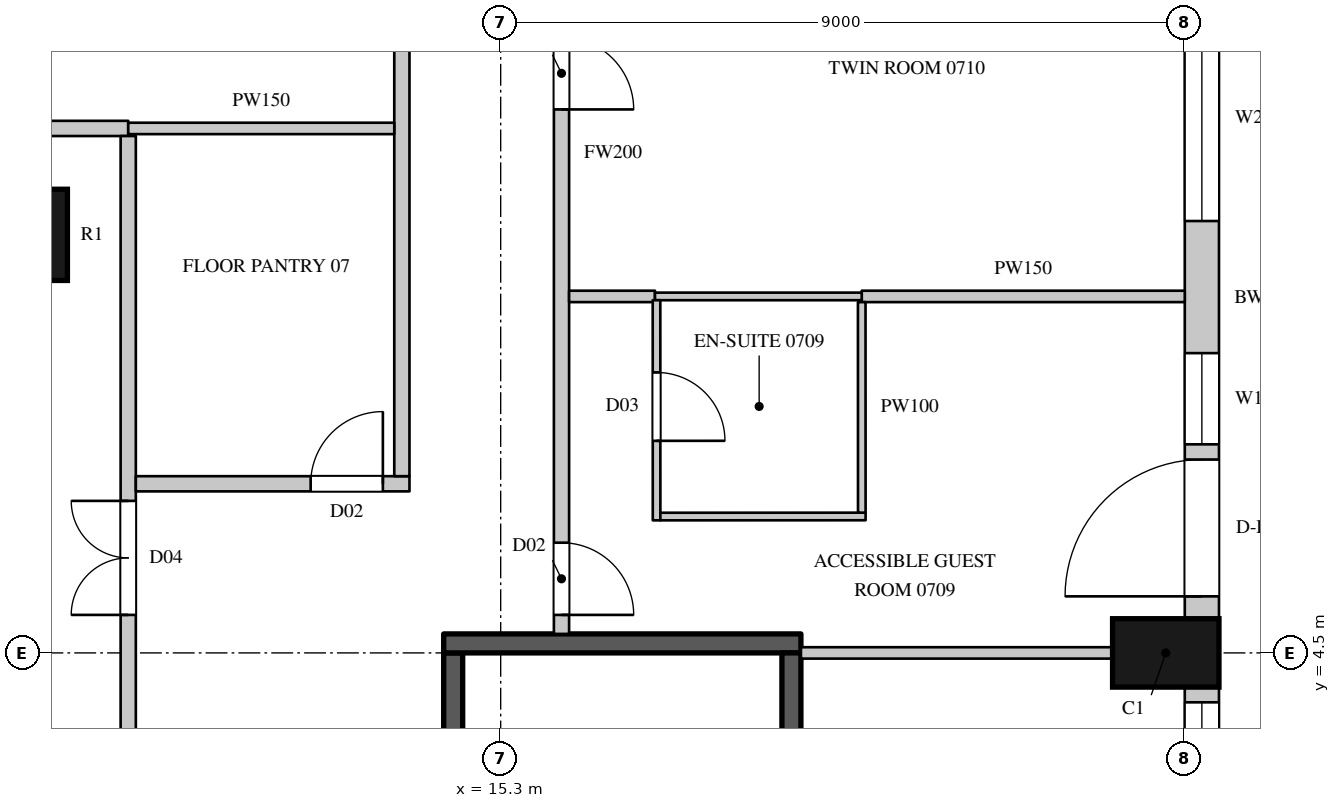
"""IFC4 building model, lengths in metres.
Left out: names, types, materials, properties, quantities, classifications, styles, units other than length and angle.
Written with IfcOpenShell. Run it as: python <this file> out.ifc"""

import sys

from ifc_helpers import new_model, si_unit, direction, frame, frame_2d, origin, origin_2d, place, context, subcontext, project, spatial, rectangle, circle, extrude, element, fill, save


model = new_model("IFC4")
c1 = context("Model", 3, precision=1e-05, world=origin(), true_north=direction((0.0, 1.0)))
c2 = subcontext(c1, "Body", "Model", "MODEL_VIEW")
j1 = project(units=[si_unit("LENGTHUNIT", "METRE"), si_unit("PLANEANGLEUNIT", "RADIAN")], contexts=[c1])
p1 = place(None, origin())
s1 = spatial("IfcSite", under=j1, at=p1, CompositionType="ELEMENT")
p2 = place(p1, origin())
s2 = spatial("IfcBuilding", under=s1, at=p2, CompositionType="ELEMENT")
p3 = place(p2, frame((0.0, 0.0, 55.5)))
s3 = spatial("IfcBuildingStorey", under=s2, at=p3, CompositionType="ELEMENT", Elevation=55.5)
p4 = place(p3, frame((24.05, 4.5, 0.0), z_axis=(0.0, 0.0, 1.0), x_axis=(0.0, 1.0, 0.0)))
e1 = element("IfcColumn", 1, at=p4, inside=s3, PredefinedType="COLUMN", context=c2, shape_type="SweptSolid", body=[
    extrude(rectangle(XDim=0.9, YDim=1.4, at=origin_2d()), origin(), (0.0, 0.0, 1.0), 3.6),
])
p5 = place(p3, frame((9.0, 10.0, 0.0), z_axis=(0.0, 0.0, 1.0), x_axis=(1.0, 0.0, 0.0)))
e2 = element("IfcColumn", 2, at=p5, inside=s3, PredefinedType="COLUMN", context=c2, shape_type="SweptSolid", body=[
    extrude(circle(Radius=0.6, at=origin_2d()), origin(), (0.0, 0.0, 1.0), 3.6),
])
p6 = place(p3, frame((24.525, -4.05, 0.0), z_axis=(0.0, 0.0, 1.0), x_axis=(0.0, 1.0, 0.0)))
e3 = element("IfcWall", 3, at=p6, inside=s3, PredefinedType="SOLIDWALL", context=c2, shape_type="SweptSolid", body=[
    extrude(rectangle(XDim=8.1, YDim=0.45, at=frame_2d((4.05, 0.0))), origin(), (0.0, 0.0, 1.0), 3.3),
])
p7 = place(p6, frame((0.2, 0.0, 0.0)))
e4 = element("IfcOpeningElement", 4, at=p7, cuts=e3, PredefinedType="OPENING", context=c2, shape_type="SweptSolid", body=[
    extrude(rectangle(XDim=1.8, YDim=2.4, at=frame_2d((0.9, 1.2))), frame((0.0, 0.235, 0.0), z_axis=(0.0, -1.0, 0.0), x_axis=(1.0, 0.0, 0.0)), (0.0, 0.0, 1.0), 0.47),
])
p8 = place(p6, frame((2.2, 0.0, 1.05)))
e5 = element("IfcOpeningElement", 5, at=p8, cuts=e3, PredefinedType="OPENING", context=c2, shape_type="SweptSolid", body=[
    extrude(rectangle(XDim=1.2, YDim=2.0, at=frame_2d((0.6, 1.0))), frame((0.0, 0.235, 0.0), z_axis=(0.0, -1.0, 0.0), x_axis=(1.0, 0.0, 0.0)), (0.0, 0.0, 1.0), 0.47),
])
p9 = place(p6, frame((4.7, 0.0, 0.0)))
e6 = element("IfcOpeningElement", 6, at=p9, cuts=e3, PredefinedType="OPENING", context=c2, shape_type="SweptSolid", body=[
    extrude(rectangle(XDim=1.8, YDim=2.4, at=frame_2d((0.9, 1.2))), frame((0.0, 0.235, 0.0), z_axis=(0.0, -1.0, 0.0), x_axis=(1.0, 0.0, 0.0)), (0.0, 0.0, 1.0), 0.47),
])
p10 = place(p6, frame((6.7, 0.0, 1.05)))
e7 = element("IfcOpeningElement", 7, at=p10, cuts=e3, PredefinedType="OPENING", context=c2, shape_type="SweptSolid", body=[
    extrude(rectangle(XDim=1.2, YDim=2.0, at=frame_2d((0.6, 1.0))), frame((0.0, 0.235, 0.0), z_axis=(0.0, -1.0, 0.0), x_axis=(1.0, 0.0, 0.0)), (0.0, 0.0, 1.0), 0.47),
])
p11 = place(p3, frame((24.525, 4.95, 0.0), z_axis=(0.0, 0.0, 1.0), x_axis=(0.0, 1.0, 0.0)))
e8 = element("IfcWall", 8, at=p11, inside=s3, PredefinedType="SOLIDWALL", context=c2, shape_type="SweptSolid", body=[
    extrude(rectangle(XDim=8.439, YDim=0.45, at=frame_2d((4.219, 0.0))), origin(), (0.0, 0.0, 1.0), 3.3),
])
p12 = place(p11, frame((0.294, 0.0, 0.0)))
e9 = element("IfcOpeningElement", 9, at=p12, cuts=e8, PredefinedType="OPENING", context=c2, shape_type="SweptSolid", body=[
    extrude(rectangle(XDim=1.8, YDim=2.4, at=frame_2d((0.9, 1.2))), frame((0.0, 0.235, 0.0), z_axis=(0.0, -1.0, 0.0), x_axis=(1.0, 0.0, 0.0)), (0.0, 0.0, 1.0), 0.47),
])
p13 = place(p11, frame((2.294, 0.0, 1.05)))
e10 = element("IfcOpeningElement", 10, at=p13, cuts=e8, PredefinedType="OPENING", context=c2, shape_type="SweptSolid", body=[
    extrude(rectangle(XDim=1.2, YDim=2.0, at=frame_2d((0.6, 1.0))), frame((0.0, 0.235, 0.0), z_axis=(0.0, -1.0, 0.0), x_axis=(1.0, 0.0, 0.0)), (0.0, 0.0, 1.0), 0.47),
])
p14 = place(p11, frame((5.232, 0.0, 1.05)))
e11 = element("IfcOpeningElement", 11, at=p14, cuts=e8, PredefinedType="OPENING", context=c2, shape_type="SweptSolid", body=[
    extrude(rectangle(XDim=2.7, YDim=2.0, at=frame_2d((1.35, 1.0))), frame((0.0, 0.235, 0.0), z_axis=(0.0, -1.0, 0.0), x_axis=(1.0, 0.0, 0.0)), (0.0, 0.0, 1.0), 0.47),
])
p15 = place(p3, frame((-8.3, 11.4, 0.0), z_axis=(0.0, 0.0, 1.0), x_axis=(1.0, 0.0, 0.0)))
e12 = element("IfcWall", 12, at=p15, inside=s3, PredefinedType="PARTITIONING", context=c2, shape_type="SweptSolid", body=[
    extrude(rectangle(XDim=18.7, YDim=0.2, at=frame_2d((9.35, 0.0))), origin(), (0.0, 0.0, 1.0), 3.3),
])
p16 = place(p15, frame((4.6, 0.0, 0.0)))
e13 = element("IfcOpeningElement", 13, at=p16, cuts=e12, PredefinedType="OPENING", context=c2, shape_type="SweptSolid", body=[
    extrude(rectangle(XDim=1.5, YDim=2.2, at=frame_2d((0.75, 1.1))), frame((0.0, 0.11, 0.0), z_axis=(0.0, -1.0, 0.0), x_axis=(1.0, 0.0, 0.0)), (0.0, 0.0, 1.0), 0.22),
])
p17 = place(p3, frame((10.4, -11.3, 0.0), z_axis=(0.0, 0.0, 1.0), x_axis=(0.0, 1.0, 0.0)))
e14 = element("IfcWall", 14, at=p17, inside=s3, PredefinedType="PARTITIONING", context=c2, shape_type="SweptSolid", body=[
    extrude(rectangle(XDim=22.6, YDim=0.2, at=frame_2d((11.3, 0.0))), origin(), (0.0, 0.0, 1.0), 3.3),
])
p18 = place(p17, frame((4.8, 0.0, 0.0)))
e15 = element("IfcOpeningElement", 15, at=p18, cuts=e14, PredefinedType="OPENING", context=c2, shape_type="SweptSolid", body=[
    extrude(rectangle(XDim=1.5, YDim=2.2, at=frame_2d((0.75, 1.1))), frame((0.0, 0.11, 0.0), z_axis=(0.0, -1.0, 0.0), x_axis=(1.0, 0.0, 0.0)), (0.0, 0.0, 1.0), 0.22),
])
p19 = place(p17, frame((16.3, 0.0, 0.0)))
e16 = element("IfcOpeningElement", 16, at=p19, cuts=e14, PredefinedType="OPENING", context=c2, shape_type="SweptSolid", body=[
    extrude(rectangle(XDim=1.5, YDim=2.2, at=frame_2d((0.75, 1.1))), frame((0.0, 0.11, 0.0), z_axis=(0.0, -1.0, 0.0), x_axis=(1.0, 0.0, 0.0)), (0.0, 0.0, 1.0), 0.22),
])
p20 = place(p17, frame((11.95, 0.0, 0.0)))
e17 = element("IfcOpeningElement", 17, at=p20, cuts=e14, PredefinedType="OPENING", context=c2, shape_type="SweptSolid", body=[
    extrude(rectangle(XDim=1.5, YDim=2.2, at=frame_2d((0.75, 1.1))), frame((0.0, 0.11, 0.0), z_axis=(0.0, -1.0, 0.0), x_axis=(1.0, 0.0, 0.0)), (0.0, 0.0, 1.0), 0.22),
])
p21 = place(p3, frame((10.5, 6.725, 0.0), z_axis=(0.0, 0.0, 1.0), x_axis=(1.0, 0.0, 0.0)))
e18 = element("IfcWall", 18, at=p21, inside=s3, PredefinedType="PARTITIONING", context=c2, shape_type="SweptSolid", body=[
    extrude(rectangle(XDim=3.6, YDim=0.2, at=frame_2d((1.8, 0.0))), origin(), (0.0, 0.0, 1.0), 3.3),
])
p22 = place(p21, frame((2.3, 0.0, 0.0)))
e19 = element("IfcOpeningElement", 19, at=p22, cuts=e18, PredefinedType="OPENING", context=c2, shape_type="SweptSolid", body=[
    extrude(rectangle(XDim=0.95, YDim=2.2, at=frame_2d((0.475, 1.1))), frame((0.0, 0.11, 0.0), z_axis=(0.0, -1.0, 0.0), x_axis=(1.0, 0.0, 0.0)), (0.0, 0.0, 1.0), 0.22),
])
p23 = place(p3, frame((14.0, 6.825, 0.0), z_axis=(0.0, 0.0, 1.0), x_axis=(0.0, 1.0, 0.0)))
e20 = element("IfcWall", 20, at=p23, inside=s3, PredefinedType="PARTITIONING", context=c2, shape_type="SweptSolid", body=[
    extrude(rectangle(XDim=8.475, YDim=0.2, at=frame_2d((4.238, 0.0))), origin(), (0.0, 0.0, 1.0), 3.3),
])
p24 = place(p3, frame((16.1, 4.75, 0.0), z_axis=(0.0, 0.0, 1.0), x_axis=(0.0, 1.0, 0.0)))
e21 = element("IfcWall", 21, at=p24, inside=s3, PredefinedType="PARTITIONING", context=c2, shape_type="SweptSolid", body=[
    extrude(rectangle(XDim=12.65, YDim=0.2, at=frame_2d((6.325, 0.0))), origin(), (0.0, 0.0, 1.0), 3.3),
])
p25 = place(p24, frame((0.25, 0.0, 0.0)))
e22 = element("IfcOpeningElement", 22, at=p25, cuts=e21, PredefinedType="OPENING", context=c2, shape_type="SweptSolid", body=[
    extrude(rectangle(XDim=0.95, YDim=2.2, at=frame_2d((0.475, 1.1))), frame((0.0, 0.11, 0.0), z_axis=(0.0, -1.0, 0.0), x_axis=(1.0, 0.0, 0.0)), (0.0, 0.0, 1.0), 0.22),
])
p26 = place(p24, frame((6.9, 0.0, 0.0)))
e23 = element("IfcOpeningElement", 23, at=p26, cuts=e21, PredefinedType="OPENING", context=c2, shape_type="SweptSolid", body=[
    extrude(rectangle(XDim=0.95, YDim=2.2, at=frame_2d((0.475, 1.1))), frame((0.0, 0.11, 0.0), z_axis=(0.0, -1.0, 0.0), x_axis=(1.0, 0.0, 0.0)), (0.0, 0.0, 1.0), 0.22),
])
p27 = place(p3, frame((10.4, 11.4, 0.0), z_axis=(0.0, 0.0, 1.0), x_axis=(1.0, 0.0, 0.0)))
e24 = element("IfcWall", 24, at=p27, inside=s3, PredefinedType="PARTITIONING", context=c2, shape_type="SweptSolid", body=[
    extrude(rectangle(XDim=3.5, YDim=0.15, at=frame_2d((1.75, 0.0))), origin(), (0.0, 0.0, 1.0), 3.3),
])
p28 = place(p3, frame((16.2, 9.19, 0.0), z_axis=(0.0, 0.0, 1.0), x_axis=(1.0, 0.0, 0.0)))
e25 = element("IfcWall", 25, at=p28, inside=s3, PredefinedType="PARTITIONING", context=c2, shape_type="SweptSolid", body=[
    extrude(rectangle(XDim=1.13, YDim=0.15, at=frame_2d((0.565, 0.0))), origin(), (0.0, 0.0, 1.0), 2.65),
])
p29 = place(p3, frame((19.25, 4.5, 0.0), z_axis=(0.0, 0.0, 1.0), x_axis=(1.0, 0.0, 0.0)))
e26 = element("IfcWall", 26, at=p29, inside=s3, PredefinedType="PARTITIONING", context=c2, shape_type="SweptSolid", body=[
    extrude(rectangle(XDim=4.1, YDim=0.15, at=frame_2d((2.05, 0.0))), origin(), (0.0, 0.0, 1.0), 3.3),
])
p30 = place(p3, frame((20.05, 9.19, 0.0), z_axis=(0.0, 0.0, 1.0), x_axis=(1.0, 0.0, 0.0)))
e27 = element("IfcWall", 27, at=p30, inside=s3, PredefinedType="PARTITIONING", context=c2, shape_type="SweptSolid", body=[
    extrude(rectangle(XDim=4.25, YDim=0.15, at=frame_2d((2.125, 0.0))), origin(), (0.0, 0.0, 1.0), 2.65),
])
p31 = place(p3, frame((14.675, -4.5, 0.0), z_axis=(0.0, 0.0, 1.0), x_axis=(0.0, 1.0, 0.0)))
e28 = element("IfcWall", 28, at=p31, inside=s3, PredefinedType="SHEAR", context=c2, shape_type="SweptSolid", body=[
    extrude(rectangle(XDim=9.0, YDim=0.25, at=frame_2d((4.5, 0.0))), origin(), (0.0, 0.0, 1.0), 3.3),
])
p32 = place(p31, frame((0.45, 0.0, 0.0)))
e29 = element("IfcOpeningElement", 29, at=p32, cuts=e28, PredefinedType="OPENING", context=c2, shape_type="SweptSolid", body=[
    extrude(rectangle(XDim=1.1, YDim=2.2, at=frame_2d((0.55, 1.1))), frame((0.0, 0.135, 0.0), z_axis=(0.0, -1.0, 0.0), x_axis=(1.0, 0.0, 0.0)), (0.0, 0.0, 1.0), 0.27),
])
p33 = place(p3, frame((14.55, 4.625, 0.0), z_axis=(0.0, 0.0, 1.0), x_axis=(1.0, 0.0, 0.0)))
e30 = element("IfcWall", 30, at=p33, inside=s3, PredefinedType="SHEAR", context=c2, shape_type="SweptSolid", body=[
    extrude(rectangle(XDim=4.7, YDim=0.25, at=frame_2d((2.35, 0.0))), origin(), (0.0, 0.0, 1.0), 3.3),
])
p34 = place(p3, frame((19.125, -4.5, 0.0), z_axis=(0.0, 0.0, 1.0), x_axis=(0.0, 1.0, 0.0)))
e31 = element("IfcWall", 31, at=p34, inside=s3, PredefinedType="SHEAR", context=c2, shape_type="SweptSolid", body=[
    extrude(rectangle(XDim=9.0, YDim=0.25, at=frame_2d((4.5, 0.0))), origin(), (0.0, 0.0, 1.0), 3.3),
])
p35 = place(p3, frame((17.33, 9.19, 0.0), z_axis=(0.0, 0.0, 1.0), x_axis=(1.0, 0.0, 0.0)))
e32 = element("IfcWall", 32, at=p35, inside=s3, PredefinedType="PARTITIONING", context=c2, shape_type="SweptSolid", body=[
    extrude(rectangle(XDim=2.72, YDim=0.1, at=frame_2d((1.36, 0.0))), origin(), (0.0, 0.0, 1.0), 2.65),
])
p36 = place(p3, frame((17.35, 9.14, 0.0), z_axis=(0.0, 0.0, 1.0), x_axis=(0.000337211244, -0.999999943144, 0.0)))
e33 = element("IfcWall", 33, at=p36, inside=s3, PredefinedType="PARTITIONING", context=c2, shape_type="SweptSolid", body=[
    extrude(rectangle(XDim=2.896, YDim=0.1, at=frame_2d((1.448, 0.0))), origin(), (0.0, 0.0, 1.0), 3.3),
])
p37 = place(p36, frame((0.95, 0.0, 0.0)))
e34 = element("IfcOpeningElement", 34, at=p37, cuts=e33, PredefinedType="OPENING", context=c2, shape_type="SweptSolid", body=[
    extrude(rectangle(XDim=0.9, YDim=2.2, at=frame_2d((0.45, 1.1))), frame((0.0, 0.06, 0.0), z_axis=(0.0, -1.0, 0.0), x_axis=(1.0, 0.0, 0.0)), (0.0, 0.0, 1.0), 0.12),
])
p38 = place(p3, frame((17.401, 6.294, 0.0), z_axis=(0.0, 0.0, 1.0), x_axis=(0.9999999346, 0.000361663629, 0.0)))
e35 = element("IfcWall", 35, at=p38, inside=s3, PredefinedType="PARTITIONING", context=c2, shape_type="SweptSolid", body=[
    extrude(rectangle(XDim=2.7, YDim=0.1, at=frame_2d((1.35, 0.0))), origin(), (0.0, 0.0, 1.0), 3.3),
])
p39 = place(p3, frame((20.05, 9.115, 0.0), z_axis=(0.0, 0.0, 1.0), x_axis=(0.000352547131, -0.999999937855, 0.0)))
e36 = element("IfcWall", 36, at=p39, inside=s3, PredefinedType="PARTITIONING", context=c2, shape_type="SweptSolid", body=[
    extrude(rectangle(XDim=2.77, YDim=0.1, at=frame_2d((1.385, 0.0))), origin(), (0.0, 0.0, 1.0), 3.3),
])
p40 = place(p10, origin())
e37 = element("IfcWindow", 37, at=p40, inside=s3, PartitioningType="SINGLE_PANEL", PredefinedType="WINDOW", context=c2, shape_type="SweptSolid", body=[
    extrude(rectangle(XDim=1.2, YDim=2.0, at=frame_2d((0.6, 1.0))), frame((0.0, 0.135, 0.0), z_axis=(0.0, -1.0, 0.0), x_axis=(1.0, 0.0, 0.0)), (0.0, 0.0, 1.0), 0.06),
])
fill(e7, e37)
p41 = place(p12, origin())
e38 = element("IfcDoor", 38, at=p41, inside=s3, OperationType="SLIDING_TO_LEFT", PredefinedType="DOOR", context=c2, shape_type="SweptSolid", body=[
    extrude(rectangle(XDim=1.8, YDim=2.4, at=frame_2d((0.9, 1.2))), frame((0.0, 0.13, 0.0), z_axis=(0.0, -1.0, 0.0), x_axis=(1.0, 0.0, 0.0)), (0.0, 0.0, 1.0), 0.05),
])
fill(e9, e38)
p42 = place(p13, origin())
e39 = element("IfcWindow", 39, at=p42, inside=s3, PartitioningType="SINGLE_PANEL", PredefinedType="WINDOW", context=c2, shape_type="SweptSolid", body=[
    extrude(rectangle(XDim=1.2, YDim=2.0, at=frame_2d((0.6, 1.0))), frame((0.0, 0.135, 0.0), z_axis=(0.0, -1.0, 0.0), x_axis=(1.0, 0.0, 0.0)), (0.0, 0.0, 1.0), 0.06),
])
fill(e10, e39)
p43 = place(p14, origin())
e40 = element("IfcWindow", 40, at=p43, inside=s3, PartitioningType="SINGLE_PANEL", PredefinedType="WINDOW", context=c2, shape_type="SweptSolid", body=[
    extrude(rectangle(XDim=2.7, YDim=2.0, at=frame_2d((1.35, 1.0))), frame((0.0, 0.135, 0.0), z_axis=(0.0, -1.0, 0.0), x_axis=(1.0, 0.0, 0.0)), (0.0, 0.0, 1.0), 0.06),
])
fill(e11, e40)
p44 = place(p19, origin())
e41 = element("IfcDoor", 41, at=p44, inside=s3, OperationType="DOUBLE_DOOR_SINGLE_SWING", PredefinedType="DOOR", context=c2, shape_type="SweptSolid", body=[
    extrude(rectangle(XDim=1.5, YDim=2.2, at=frame_2d((0.75, 1.1))), frame((0.0, 0.025, 0.0), z_axis=(0.0, -1.0, 0.0), x_axis=(1.0, 0.0, 0.0)), (0.0, 0.0, 1.0), 0.05),
])
fill(e16, e41)
p45 = place(p22, origin())
e42 = element("IfcDoor", 42, at=p45, inside=s3, OperationType="SINGLE_SWING_RIGHT", PredefinedType="DOOR", context=c2, shape_type="SweptSolid", body=[
    extrude(rectangle(XDim=0.95, YDim=2.2, at=frame_2d((0.475, 1.1))), frame((0.0, 0.025, 0.0), z_axis=(0.0, -1.0, 0.0), x_axis=(1.0, 0.0, 0.0)), (0.0, 0.0, 1.0), 0.05),
])
fill(e19, e42)
p46 = place(p25, origin())
e43 = element("IfcDoor", 43, at=p46, inside=s3, OperationType="SINGLE_SWING_RIGHT", PredefinedType="DOOR", context=c2, shape_type="SweptSolid", body=[
    extrude(rectangle(XDim=0.95, YDim=2.2, at=frame_2d((0.475, 1.1))), frame((0.0, 0.025, 0.0), z_axis=(0.0, -1.0, 0.0), x_axis=(1.0, 0.0, 0.0)), (0.0, 0.0, 1.0), 0.05),
])
fill(e22, e43)
p47 = place(p37, origin())
e44 = element("IfcDoor", 44, at=p47, inside=s3, OperationType="SINGLE_SWING_RIGHT", PredefinedType="DOOR", context=c2, shape_type="SweptSolid", body=[
    extrude(rectangle(XDim=0.9, YDim=2.2, at=frame_2d((0.45, 1.1))), frame((0.0, 0.025, 0.0), z_axis=(0.0, -1.0, 0.0), x_axis=(1.0, 0.0, 0.0)), (0.0, 0.0, 1.0), 0.05),
])
fill(e34, e44)
p48 = place(p26, origin())
e45 = element("IfcDoor", 45, at=p48, inside=s3, OperationType="SINGLE_SWING_RIGHT", PredefinedType="DOOR", context=c2, shape_type="SweptSolid", body=[
    extrude(rectangle(XDim=0.95, YDim=2.2, at=frame_2d((0.475, 1.1))), frame((0.0, 0.025, 0.0), z_axis=(0.0, -1.0, 0.0), x_axis=(1.0, 0.0, 0.0)), (0.0, 0.0, 1.0), 0.05),
])
fill(e23, e45)
save(model, sys.argv[1])
